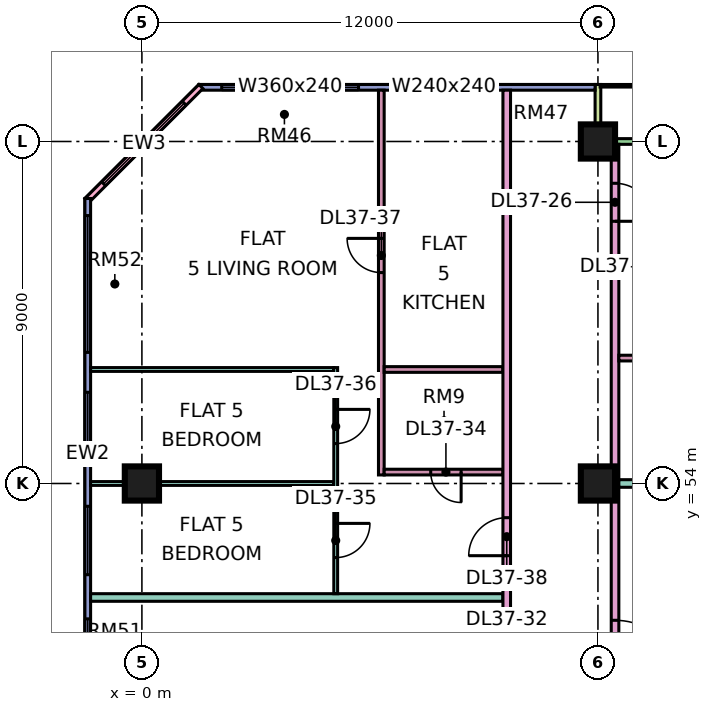
"""IFC4 building model, lengths in metres.
Left out: names, types, materials, properties, quantities, classifications, styles, units other than length and angle.
Written with IfcOpenShell. Run it as: python <this file> out.ifc"""

import sys

from ifc_helpers import new_model, si_unit, direction, frame, frame_2d, origin, origin_2d, place, context, subcontext, project, spatial, rectangle, extrude, element, fill, save


model = new_model("IFC4")
c1 = context("Model", 3, precision=1e-05, world=origin(), true_north=direction((0.0, 1.0)))
c2 = subcontext(c1, "Body", "Model", "MODEL_VIEW")
j1 = project(units=[si_unit("LENGTHUNIT", "METRE"), si_unit("PLANEANGLEUNIT", "RADIAN")], contexts=[c1])
p1 = place(None, origin())
s1 = spatial("IfcSite", under=j1, at=p1, CompositionType="ELEMENT")
p2 = place(p1, origin())
s2 = spatial("IfcBuilding", under=s1, at=p2, CompositionType="ELEMENT")
p3 = place(p2, frame((0.0, 0.0, 164.9)))
s3 = spatial("IfcBuildingStorey", under=s2, at=p3, CompositionType="ELEMENT", Elevation=164.9)
for number, where, z_axis, x_axis in (
    (1, (0.0, 54.0, 0.0), (0.0, 0.0, 1.0), (1.0, 0.0, 0.0)),
    (2, (12.0, 54.0, 0.0), (0.0, 0.0, 1.0), (1.0, 0.0, 0.0)),
    (3, (12.0, 63.0, 0.0), (0.0, 0.0, 1.0), (1.0, 0.0, 0.0)),
):
    element("IfcColumn", number, at=place(p3, frame(where, z_axis=z_axis, x_axis=x_axis)), inside=s3, PredefinedType="COLUMN", context=c2, shape_type="SweptSolid", body=[
        extrude(rectangle(XDim=0.9, YDim=0.9, at=origin_2d()), origin(), (0.0, 0.0, 1.0), 3.75),
    ])
p4 = place(p3, frame((22.425, 63.0, 0.0), z_axis=(0.0, 0.0, 1.0), x_axis=(-1.0, 0.0, 0.0)))
e4 = element("IfcWall", 4, at=p4, inside=s3, PredefinedType="SOLIDWALL", context=c2, shape_type="SweptSolid", body=[
    extrude(rectangle(XDim=10.35, YDim=0.15, at=frame_2d((5.175, 0.0))), origin(), (0.0, 0.0, 1.0), 3.35),
])
p5 = place(p4, frame((1.087, 0.0, 0.0)))
e5 = element("IfcOpeningElement", 5, at=p5, cuts=e4, PredefinedType="OPENING", context=c2, shape_type="SweptSolid", body=[
    extrude(rectangle(XDim=1.8, YDim=2.4, at=frame_2d((0.9, 1.2))), frame((0.0, 0.085, 0.0), z_axis=(0.0, -1.0, 0.0), x_axis=(1.0, 0.0, 0.0)), (0.0, 0.0, 1.0), 0.17),
])
p6 = place(p4, frame((5.425, 0.0, 0.45)))
e6 = element("IfcOpeningElement", 6, at=p6, cuts=e4, PredefinedType="OPENING", context=c2, shape_type="SweptSolid", body=[
    extrude(rectangle(XDim=3.0, YDim=2.4, at=frame_2d((1.5, 1.2))), frame((0.0, 0.085, 0.0), z_axis=(0.0, -1.0, 0.0), x_axis=(1.0, 0.0, 0.0)), (0.0, 0.0, 1.0), 0.17),
])
p7 = place(p3, frame((12.0, 64.5, 0.0), z_axis=(0.0, 0.0, 1.0), x_axis=(0.0, -1.0, 0.0)))
e7 = element("IfcWall", 7, at=p7, inside=s3, PredefinedType="SOLIDWALL", context=c2, shape_type="SweptSolid", body=[
    extrude(rectangle(XDim=1.5, YDim=0.15, at=frame_2d((0.75, 0.0))), origin(), (0.0, 0.0, 1.0), 3.35),
])
p8 = place(p3, frame((11.925, 64.425, 0.0), z_axis=(0.0, 0.0, 1.0), x_axis=(-1.0, 0.0, 0.0)))
e8 = element("IfcWall", 8, at=p8, inside=s3, PredefinedType="SOLIDWALL", context=c2, shape_type="SweptSolid", body=[
    extrude(rectangle(XDim=10.425, YDim=0.15, at=frame_2d((5.212, 0.0))), origin(), (0.0, 0.0, 1.0), 3.35),
])
p9 = place(p8, frame((2.775, 0.0, 0.45)))
e9 = element("IfcOpeningElement", 9, at=p9, cuts=e8, PredefinedType="OPENING", context=c2, shape_type="SweptSolid", body=[
    extrude(rectangle(XDim=2.4, YDim=2.4, at=frame_2d((1.2, 1.2))), frame((0.0, 0.085, 0.0), z_axis=(0.0, -1.0, 0.0), x_axis=(1.0, 0.0, 0.0)), (0.0, 0.0, 1.0), 0.17),
])
p10 = place(p8, frame((6.225, 0.0, 0.45)))
e10 = element("IfcOpeningElement", 10, at=p10, cuts=e8, PredefinedType="OPENING", context=c2, shape_type="SweptSolid", body=[
    extrude(rectangle(XDim=3.6, YDim=2.4, at=frame_2d((1.8, 1.2))), frame((0.0, 0.085, 0.0), z_axis=(0.0, -1.0, 0.0), x_axis=(1.0, 0.0, 0.0)), (0.0, 0.0, 1.0), 0.17),
])
p11 = place(p3, frame((1.553, 64.447, 0.0), z_axis=(0.0, 0.0, 1.0), x_axis=(-0.707106781187, -0.707106781187, 0.0)))
e11 = element("IfcWall", 11, at=p11, inside=s3, PredefinedType="SOLIDWALL", context=c2, shape_type="SweptSolid", body=[
    extrude(rectangle(XDim=4.243, YDim=0.15, at=frame_2d((2.121, 0.0))), origin(), (0.0, 0.0, 1.0), 3.35),
])
p12 = place(p11, frame((0.621, 0.0, 0.45)))
e12 = element("IfcOpeningElement", 12, at=p12, cuts=e11, PredefinedType="OPENING", context=c2, shape_type="SweptSolid", body=[
    extrude(rectangle(XDim=3.0, YDim=2.4, at=frame_2d((1.5, 1.2))), frame((0.0, 0.085, 0.0), z_axis=(0.0, -1.0, 0.0), x_axis=(1.0, 0.0, 0.0)), (0.0, 0.0, 1.0), 0.17),
])
p13 = place(p3, frame((-1.425, 61.5, 0.0), z_axis=(0.0, 0.0, 1.0), x_axis=(0.0, -1.0, 0.0)))
e13 = element("IfcWall", 13, at=p13, inside=s3, PredefinedType="SOLIDWALL", context=c2, shape_type="SweptSolid", body=[
    extrude(rectangle(XDim=13.425, YDim=0.15, at=frame_2d((6.712, 0.0))), origin(), (0.0, 0.0, 1.0), 3.35),
])
p14 = place(p13, frame((0.45, 0.0, 0.45)))
e14 = element("IfcOpeningElement", 14, at=p14, cuts=e13, PredefinedType="OPENING", context=c2, shape_type="SweptSolid", body=[
    extrude(rectangle(XDim=3.6, YDim=2.4, at=frame_2d((1.8, 1.2))), frame((0.0, 0.085, 0.0), z_axis=(0.0, -1.0, 0.0), x_axis=(1.0, 0.0, 0.0)), (0.0, 0.0, 1.0), 0.17),
])
p15 = place(p13, frame((5.1, 0.0, 0.45)))
e15 = element("IfcOpeningElement", 15, at=p15, cuts=e13, PredefinedType="OPENING", context=c2, shape_type="SweptSolid", body=[
    extrude(rectangle(XDim=1.8, YDim=2.4, at=frame_2d((0.9, 1.2))), frame((0.0, 0.085, 0.0), z_axis=(0.0, -1.0, 0.0), x_axis=(1.0, 0.0, 0.0)), (0.0, 0.0, 1.0), 0.17),
])
p16 = place(p13, frame((8.1, 0.0, 0.45)))
e16 = element("IfcOpeningElement", 16, at=p16, cuts=e13, PredefinedType="OPENING", context=c2, shape_type="SweptSolid", body=[
    extrude(rectangle(XDim=1.8, YDim=2.4, at=frame_2d((0.9, 1.2))), frame((0.0, 0.085, 0.0), z_axis=(0.0, -1.0, 0.0), x_axis=(1.0, 0.0, 0.0)), (0.0, 0.0, 1.0), 0.17),
])
p17 = place(p13, frame((11.062, 0.0, 0.45)))
e17 = element("IfcOpeningElement", 17, at=p17, cuts=e13, PredefinedType="OPENING", context=c2, shape_type="SweptSolid", body=[
    extrude(rectangle(XDim=1.8, YDim=2.4, at=frame_2d((0.9, 1.2))), frame((0.0, 0.085, 0.0), z_axis=(0.0, -1.0, 0.0), x_axis=(1.0, 0.0, 0.0)), (0.0, 0.0, 1.0), 0.17),
])
p18 = place(p3, frame((-1.351, 54.0, 0.0), z_axis=(0.0, 0.0, 1.0), x_axis=(1.0, 0.0, 0.0)))
e18 = element("IfcWall", 18, at=p18, inside=s3, PredefinedType="PARTITIONING", context=c2, shape_type="SweptSolid", body=[
    extrude(rectangle(XDim=6.401, YDim=0.1, at=frame_2d((3.201, 0.0))), origin(), (0.0, 0.0, 1.0), 3.35),
])
p19 = place(p3, frame((-1.35, 51.0, 0.0), z_axis=(0.0, 0.0, 1.0), x_axis=(1.0, 0.0, 0.0)))
e19 = element("IfcWall", 19, at=p19, inside=s3, PredefinedType="PARTITIONING", context=c2, shape_type="SweptSolid", body=[
    extrude(rectangle(XDim=10.85, YDim=0.2, at=frame_2d((5.425, 0.0))), origin(), (0.0, 0.0, 1.0), 3.35),
])
p20 = place(p3, frame((-1.35, 57.0, 0.0), z_axis=(0.0, 0.0, 1.0), x_axis=(1.0, 0.0, 0.0)))
e20 = element("IfcWall", 20, at=p20, inside=s3, PredefinedType="PARTITIONING", context=c2, shape_type="SweptSolid", body=[
    extrude(rectangle(XDim=6.4, YDim=0.1, at=frame_2d((3.2, 0.0))), origin(), (0.0, 0.0, 1.0), 3.35),
])
p21 = place(p3, frame((5.1, 51.1, 0.0), z_axis=(0.0, 0.0, 1.0), x_axis=(0.0, 1.0, 0.0)))
e21 = element("IfcWall", 21, at=p21, inside=s3, PredefinedType="PARTITIONING", context=c2, shape_type="SweptSolid", body=[
    extrude(rectangle(XDim=5.95, YDim=0.1, at=frame_2d((2.975, 0.0))), origin(), (0.0, 0.0, 1.0), 3.35),
])
p22 = place(p21, frame((0.95, 0.0, 0.0)))
e22 = element("IfcOpeningElement", 22, at=p22, cuts=e21, PredefinedType="OPENING", context=c2, shape_type="SweptSolid", body=[
    extrude(rectangle(XDim=0.9, YDim=2.1, at=frame_2d((0.45, 1.05))), frame((0.0, 0.06, 0.0), z_axis=(0.0, -1.0, 0.0), x_axis=(1.0, 0.0, 0.0)), (0.0, 0.0, 1.0), 0.12),
])
p23 = place(p21, frame((3.95, 0.0, 0.0)))
e23 = element("IfcOpeningElement", 23, at=p23, cuts=e21, PredefinedType="OPENING", context=c2, shape_type="SweptSolid", body=[
    extrude(rectangle(XDim=0.9, YDim=2.1, at=frame_2d((0.45, 1.05))), frame((0.0, 0.06, 0.0), z_axis=(0.0, -1.0, 0.0), x_axis=(1.0, 0.0, 0.0)), (0.0, 0.0, 1.0), 0.12),
])
p24 = place(p3, frame((6.3, 54.225, 0.0), z_axis=(0.0, 0.0, 1.0), x_axis=(0.0, 1.0, 0.0)))
e24 = element("IfcWall", 24, at=p24, inside=s3, PredefinedType="PARTITIONING", context=c2, shape_type="SweptSolid", body=[
    extrude(rectangle(XDim=10.125, YDim=0.15, at=frame_2d((5.062, 0.0))), origin(), (0.0, 0.0, 1.0), 3.35),
])
p25 = place(p24, frame((5.325, 0.0, 0.0)))
e25 = element("IfcOpeningElement", 25, at=p25, cuts=e24, PredefinedType="OPENING", context=c2, shape_type="SweptSolid", body=[
    extrude(rectangle(XDim=0.9, YDim=2.1, at=frame_2d((0.45, 1.05))), frame((0.0, 0.085, 0.0), z_axis=(0.0, -1.0, 0.0), x_axis=(1.0, 0.0, 0.0)), (0.0, 0.0, 1.0), 0.17),
])
p26 = place(p3, frame((6.375, 54.3, 0.0), z_axis=(0.0, 0.0, 1.0), x_axis=(1.0, 0.0, 0.0)))
e26 = element("IfcWall", 26, at=p26, inside=s3, PredefinedType="PARTITIONING", context=c2, shape_type="SweptSolid", body=[
    extrude(rectangle(XDim=3.125, YDim=0.15, at=frame_2d((1.562, 0.0))), origin(), (0.0, 0.0, 1.0), 3.35),
])
p27 = place(p26, frame((1.225, 0.0, 0.0)))
e27 = element("IfcOpeningElement", 27, at=p27, cuts=e26, PredefinedType="OPENING", context=c2, shape_type="SweptSolid", body=[
    extrude(rectangle(XDim=0.8, YDim=2.1, at=frame_2d((0.4, 1.05))), frame((0.0, 0.085, 0.0), z_axis=(0.0, -1.0, 0.0), x_axis=(1.0, 0.0, 0.0)), (0.0, 0.0, 1.0), 0.17),
])
p28 = place(p3, frame((6.375, 57.0, 0.0), z_axis=(0.0, 0.0, 1.0), x_axis=(1.0, 0.0, 0.0)))
e28 = element("IfcWall", 28, at=p28, inside=s3, PredefinedType="PARTITIONING", context=c2, shape_type="SweptSolid", body=[
    extrude(rectangle(XDim=3.125, YDim=0.15, at=frame_2d((1.562, 0.0))), origin(), (0.0, 0.0, 1.0), 3.35),
])
p29 = place(p3, frame((9.6, 20.0, 0.0), z_axis=(0.0, 0.0, 1.0), x_axis=(0.0, 1.0, 0.0)))
e29 = element("IfcWall", 29, at=p29, inside=s3, PredefinedType="PARTITIONING", context=c2, shape_type="SweptSolid", body=[
    extrude(rectangle(XDim=44.35, YDim=0.2, at=frame_2d((22.175, 0.0))), origin(), (0.0, 0.0, 1.0), 3.35),
])
p30 = place(p29, frame((28.8, 0.0, 0.0)))
e30 = element("IfcOpeningElement", 30, at=p30, cuts=e29, PredefinedType="OPENING", context=c2, shape_type="SweptSolid", body=[
    extrude(rectangle(XDim=1.0, YDim=2.1, at=frame_2d((0.5, 1.05))), frame((0.0, 0.11, 0.0), z_axis=(0.0, -1.0, 0.0), x_axis=(1.0, 0.0, 0.0)), (0.0, 0.0, 1.0), 0.22),
])
p31 = place(p29, frame((32.1, 0.0, 0.0)))
e31 = element("IfcOpeningElement", 31, at=p31, cuts=e29, PredefinedType="OPENING", context=c2, shape_type="SweptSolid", body=[
    extrude(rectangle(XDim=1.0, YDim=2.1, at=frame_2d((0.5, 1.05))), frame((0.0, 0.11, 0.0), z_axis=(0.0, -1.0, 0.0), x_axis=(1.0, 0.0, 0.0)), (0.0, 0.0, 1.0), 0.22),
])
p32 = place(p29, frame((0.6, 0.0, 0.0)))
e32 = element("IfcOpeningElement", 32, at=p32, cuts=e29, PredefinedType="OPENING", context=c2, shape_type="SweptSolid", body=[
    extrude(rectangle(XDim=1.2, YDim=2.1, at=frame_2d((0.6, 1.05))), frame((0.0, 0.11, 0.0), z_axis=(0.0, -1.0, 0.0), x_axis=(1.0, 0.0, 0.0)), (0.0, 0.0, 1.0), 0.22),
])
p33 = place(p29, frame((14.25, 0.0, 0.0)))
e33 = element("IfcOpeningElement", 33, at=p33, cuts=e29, PredefinedType="OPENING", context=c2, shape_type="SweptSolid", body=[
    extrude(rectangle(XDim=1.0, YDim=2.1, at=frame_2d((0.5, 1.05))), frame((0.0, 0.11, 0.0), z_axis=(0.0, -1.0, 0.0), x_axis=(1.0, 0.0, 0.0)), (0.0, 0.0, 1.0), 0.22),
])
p34 = place(p3, frame((12.45, 20.0, 0.0), z_axis=(0.0, 0.0, 1.0), x_axis=(0.0, 1.0, 0.0)))
e34 = element("IfcWall", 34, at=p34, inside=s3, PredefinedType="PARTITIONING", context=c2, shape_type="SweptSolid", body=[
    extrude(rectangle(XDim=42.926, YDim=0.2, at=frame_2d((21.463, 0.0))), origin(), (0.0, 0.0, 1.0), 3.35),
])
p35 = place(p34, frame((6.55, 0.0, 0.0)))
e35 = element("IfcOpeningElement", 35, at=p35, cuts=e34, PredefinedType="OPENING", context=c2, shape_type="SweptSolid", body=[
    extrude(rectangle(XDim=1.0, YDim=2.1, at=frame_2d((0.5, 1.05))), frame((0.0, 0.11, 0.0), z_axis=(0.0, -1.0, 0.0), x_axis=(1.0, 0.0, 0.0)), (0.0, 0.0, 1.0), 0.22),
])
p36 = place(p34, frame((12.25, 0.0, 0.0)))
e36 = element("IfcOpeningElement", 36, at=p36, cuts=e34, PredefinedType="OPENING", context=c2, shape_type="SweptSolid", body=[
    extrude(rectangle(XDim=1.6, YDim=2.1, at=frame_2d((0.8, 1.05))), frame((0.0, 0.11, 0.0), z_axis=(0.0, -1.0, 0.0), x_axis=(1.0, 0.0, 0.0)), (0.0, 0.0, 1.0), 0.22),
])
p37 = place(p34, frame((16.9, 0.0, 0.0)))
e37 = element("IfcOpeningElement", 37, at=p37, cuts=e34, PredefinedType="OPENING", context=c2, shape_type="SweptSolid", body=[
    extrude(rectangle(XDim=1.0, YDim=2.1, at=frame_2d((0.5, 1.05))), frame((0.0, 0.11, 0.0), z_axis=(0.0, -1.0, 0.0), x_axis=(1.0, 0.0, 0.0)), (0.0, 0.0, 1.0), 0.22),
])
p38 = place(p34, frame((40.9, 0.0, 0.0)))
e38 = element("IfcOpeningElement", 38, at=p38, cuts=e34, PredefinedType="OPENING", context=c2, shape_type="SweptSolid", body=[
    extrude(rectangle(XDim=1.0, YDim=2.1, at=frame_2d((0.5, 1.05))), frame((0.0, 0.11, 0.0), z_axis=(0.0, -1.0, 0.0), x_axis=(1.0, 0.0, 0.0)), (0.0, 0.0, 1.0), 0.22),
])
p39 = place(p34, frame((1.15, 0.0, 0.0)))
e39 = element("IfcOpeningElement", 39, at=p39, cuts=e34, PredefinedType="OPENING", context=c2, shape_type="SweptSolid", body=[
    extrude(rectangle(XDim=1.8, YDim=2.1, at=frame_2d((0.9, 1.05))), frame((0.0, 0.11, 0.0), z_axis=(0.0, -1.0, 0.0), x_axis=(1.0, 0.0, 0.0)), (0.0, 0.0, 1.0), 0.22),
])
p40 = place(p34, frame((28.6, 0.0, 0.0)))
e40 = element("IfcOpeningElement", 40, at=p40, cuts=e34, PredefinedType="OPENING", context=c2, shape_type="SweptSolid", body=[
    extrude(rectangle(XDim=1.8, YDim=2.1, at=frame_2d((0.9, 1.05))), frame((0.0, 0.11, 0.0), z_axis=(0.0, -1.0, 0.0), x_axis=(1.0, 0.0, 0.0)), (0.0, 0.0, 1.0), 0.22),
])
p41 = place(p3, frame((12.55, 54.0, 0.0), z_axis=(0.0, 0.0, 1.0), x_axis=(1.0, 0.0, 0.0)))
e41 = element("IfcWall", 41, at=p41, inside=s3, PredefinedType="PARTITIONING", context=c2, shape_type="SweptSolid", body=[
    extrude(rectangle(XDim=11.45, YDim=0.2, at=frame_2d((5.725, 0.0))), origin(), (0.0, 0.0, 1.0), 3.35),
])
p42 = place(p3, frame((12.55, 57.3, 0.0), z_axis=(0.0, 0.0, 1.0), x_axis=(1.0, 0.0, 0.0)))
e42 = element("IfcWall", 42, at=p42, inside=s3, PredefinedType="PARTITIONING", context=c2, shape_type="SweptSolid", body=[
    extrude(rectangle(XDim=4.625, YDim=0.15, at=frame_2d((2.312, 0.0))), origin(), (0.0, 0.0, 1.0), 3.35),
])
p43 = place(p3, frame((12.55, 59.7, 0.0), z_axis=(0.0, 0.0, 1.0), x_axis=(1.0, 0.0, 0.0)))
e43 = element("IfcWall", 43, at=p43, inside=s3, PredefinedType="PARTITIONING", context=c2, shape_type="SweptSolid", body=[
    extrude(rectangle(XDim=4.625, YDim=0.15, at=frame_2d((2.312, 0.0))), origin(), (0.0, 0.0, 1.0), 3.35),
])
p44 = place(p43, frame((1.85, 0.0, 0.0)))
e44 = element("IfcOpeningElement", 44, at=p44, cuts=e43, PredefinedType="OPENING", context=c2, shape_type="SweptSolid", body=[
    extrude(rectangle(XDim=0.8, YDim=2.1, at=frame_2d((0.4, 1.05))), frame((0.0, 0.085, 0.0), z_axis=(0.0, -1.0, 0.0), x_axis=(1.0, 0.0, 0.0)), (0.0, 0.0, 1.0), 0.17),
])
p45 = place(p9, origin())
e45 = element("IfcWindow", 45, at=p45, inside=s3, PartitioningType="SINGLE_PANEL", PredefinedType="WINDOW", context=c2, shape_type="SweptSolid", body=[
    extrude(rectangle(XDim=2.4, YDim=2.4, at=frame_2d((1.2, 1.2))), frame((0.0, 0.03, 0.0), z_axis=(0.0, -1.0, 0.0), x_axis=(1.0, 0.0, 0.0)), (0.0, 0.0, 1.0), 0.06),
])
fill(e9, e45)
p46 = place(p10, origin())
e46 = element("IfcWindow", 46, at=p46, inside=s3, PartitioningType="SINGLE_PANEL", PredefinedType="WINDOW", context=c2, shape_type="SweptSolid", body=[
    extrude(rectangle(XDim=3.6, YDim=2.4, at=frame_2d((1.8, 1.2))), frame((0.0, 0.03, 0.0), z_axis=(0.0, -1.0, 0.0), x_axis=(1.0, 0.0, 0.0)), (0.0, 0.0, 1.0), 0.06),
])
fill(e10, e46)
p47 = place(p12, origin())
e47 = element("IfcWindow", 47, at=p47, inside=s3, PartitioningType="SINGLE_PANEL", PredefinedType="WINDOW", context=c2, shape_type="SweptSolid", body=[
    extrude(rectangle(XDim=3.0, YDim=2.4, at=frame_2d((1.5, 1.2))), frame((0.0, 0.03, 0.0), z_axis=(0.0, -1.0, 0.0), x_axis=(1.0, 0.0, 0.0)), (0.0, 0.0, 1.0), 0.06),
])
fill(e12, e47)
p48 = place(p14, origin())
e48 = element("IfcWindow", 48, at=p48, inside=s3, PartitioningType="SINGLE_PANEL", PredefinedType="WINDOW", context=c2, shape_type="SweptSolid", body=[
    extrude(rectangle(XDim=3.6, YDim=2.4, at=frame_2d((1.8, 1.2))), frame((0.0, 0.03, 0.0), z_axis=(0.0, -1.0, 0.0), x_axis=(1.0, 0.0, 0.0)), (0.0, 0.0, 1.0), 0.06),
])
fill(e14, e48)
p49 = place(p15, origin())
e49 = element("IfcWindow", 49, at=p49, inside=s3, PartitioningType="SINGLE_PANEL", PredefinedType="WINDOW", context=c2, shape_type="SweptSolid", body=[
    extrude(rectangle(XDim=1.8, YDim=2.4, at=frame_2d((0.9, 1.2))), frame((0.0, 0.03, 0.0), z_axis=(0.0, -1.0, 0.0), x_axis=(1.0, 0.0, 0.0)), (0.0, 0.0, 1.0), 0.06),
])
fill(e15, e49)
p50 = place(p16, origin())
e50 = element("IfcWindow", 50, at=p50, inside=s3, PartitioningType="SINGLE_PANEL", PredefinedType="WINDOW", context=c2, shape_type="SweptSolid", body=[
    extrude(rectangle(XDim=1.8, YDim=2.4, at=frame_2d((0.9, 1.2))), frame((0.0, 0.03, 0.0), z_axis=(0.0, -1.0, 0.0), x_axis=(1.0, 0.0, 0.0)), (0.0, 0.0, 1.0), 0.06),
])
fill(e16, e50)
p51 = place(p17, origin())
e51 = element("IfcWindow", 51, at=p51, inside=s3, PartitioningType="SINGLE_PANEL", PredefinedType="WINDOW", context=c2, shape_type="SweptSolid", body=[
    extrude(rectangle(XDim=1.8, YDim=2.4, at=frame_2d((0.9, 1.2))), frame((0.0, 0.03, 0.0), z_axis=(0.0, -1.0, 0.0), x_axis=(1.0, 0.0, 0.0)), (0.0, 0.0, 1.0), 0.06),
])
fill(e17, e51)
p52 = place(p38, frame((1.0, 0.0, 0.0), z_axis=(0.0, 0.0, 1.0), x_axis=(-1.0, 0.0, 0.0)))
e52 = element("IfcDoor", 52, at=p52, inside=s3, OperationType="SINGLE_SWING_LEFT", PredefinedType="DOOR", context=c2, shape_type="SweptSolid", body=[
    extrude(rectangle(XDim=1.0, YDim=2.1, at=frame_2d((0.5, 1.05))), frame((0.0, 0.025, 0.0), z_axis=(0.0, -1.0, 0.0), x_axis=(1.0, 0.0, 0.0)), (0.0, 0.0, 1.0), 0.05),
])
fill(e38, e52)
p53 = place(p27, origin())
e53 = element("IfcDoor", 53, at=p53, inside=s3, OperationType="SINGLE_SWING_RIGHT", PredefinedType="DOOR", context=c2, shape_type="SweptSolid", body=[
    extrude(rectangle(XDim=0.8, YDim=2.1, at=frame_2d((0.4, 1.05))), frame((0.0, 0.025, 0.0), z_axis=(0.0, -1.0, 0.0), x_axis=(1.0, 0.0, 0.0)), (0.0, 0.0, 1.0), 0.05),
])
fill(e27, e53)
p54 = place(p22, origin())
e54 = element("IfcDoor", 54, at=p54, inside=s3, OperationType="SINGLE_SWING_RIGHT", PredefinedType="DOOR", context=c2, shape_type="SweptSolid", body=[
    extrude(rectangle(XDim=0.9, YDim=2.1, at=frame_2d((0.45, 1.05))), frame((0.0, 0.025, 0.0), z_axis=(0.0, -1.0, 0.0), x_axis=(1.0, 0.0, 0.0)), (0.0, 0.0, 1.0), 0.05),
])
fill(e22, e54)
p55 = place(p23, origin())
e55 = element("IfcDoor", 55, at=p55, inside=s3, OperationType="SINGLE_SWING_RIGHT", PredefinedType="DOOR", context=c2, shape_type="SweptSolid", body=[
    extrude(rectangle(XDim=0.9, YDim=2.1, at=frame_2d((0.45, 1.05))), frame((0.0, 0.025, 0.0), z_axis=(0.0, -1.0, 0.0), x_axis=(1.0, 0.0, 0.0)), (0.0, 0.0, 1.0), 0.05),
])
fill(e23, e55)
p56 = place(p25, frame((0.9, 0.0, 0.0), z_axis=(0.0, 0.0, 1.0), x_axis=(-1.0, 0.0, 0.0)))
e56 = element("IfcDoor", 56, at=p56, inside=s3, OperationType="SINGLE_SWING_RIGHT", PredefinedType="DOOR", context=c2, shape_type="SweptSolid", body=[
    extrude(rectangle(XDim=0.9, YDim=2.1, at=frame_2d((0.45, 1.05))), frame((0.0, 0.025, 0.0), z_axis=(0.0, -1.0, 0.0), x_axis=(1.0, 0.0, 0.0)), (0.0, 0.0, 1.0), 0.05),
])
fill(e25, e56)
p57 = place(p31, origin())
e57 = element("IfcDoor", 57, at=p57, inside=s3, OperationType="SINGLE_SWING_LEFT", PredefinedType="DOOR", context=c2, shape_type="SweptSolid", body=[
    extrude(rectangle(XDim=1.0, YDim=2.1, at=frame_2d((0.5, 1.05))), frame((0.0, 0.025, 0.0), z_axis=(0.0, -1.0, 0.0), x_axis=(1.0, 0.0, 0.0)), (0.0, 0.0, 1.0), 0.05),
])
fill(e31, e57)
p58 = place(p40, frame((1.8, 0.0, 0.0), z_axis=(0.0, 0.0, 1.0), x_axis=(-1.0, 0.0, 0.0)))
e58 = element("IfcDoor", 58, at=p58, inside=s3, OperationType="DOUBLE_DOOR_SINGLE_SWING", PredefinedType="DOOR", context=c2, shape_type="SweptSolid", body=[
    extrude(rectangle(XDim=1.8, YDim=2.1, at=frame_2d((0.9, 1.05))), frame((0.0, 0.025, 0.0), z_axis=(0.0, -1.0, 0.0), x_axis=(1.0, 0.0, 0.0)), (0.0, 0.0, 1.0), 0.05),
])
fill(e40, e58)
save(model, sys.argv[1])
